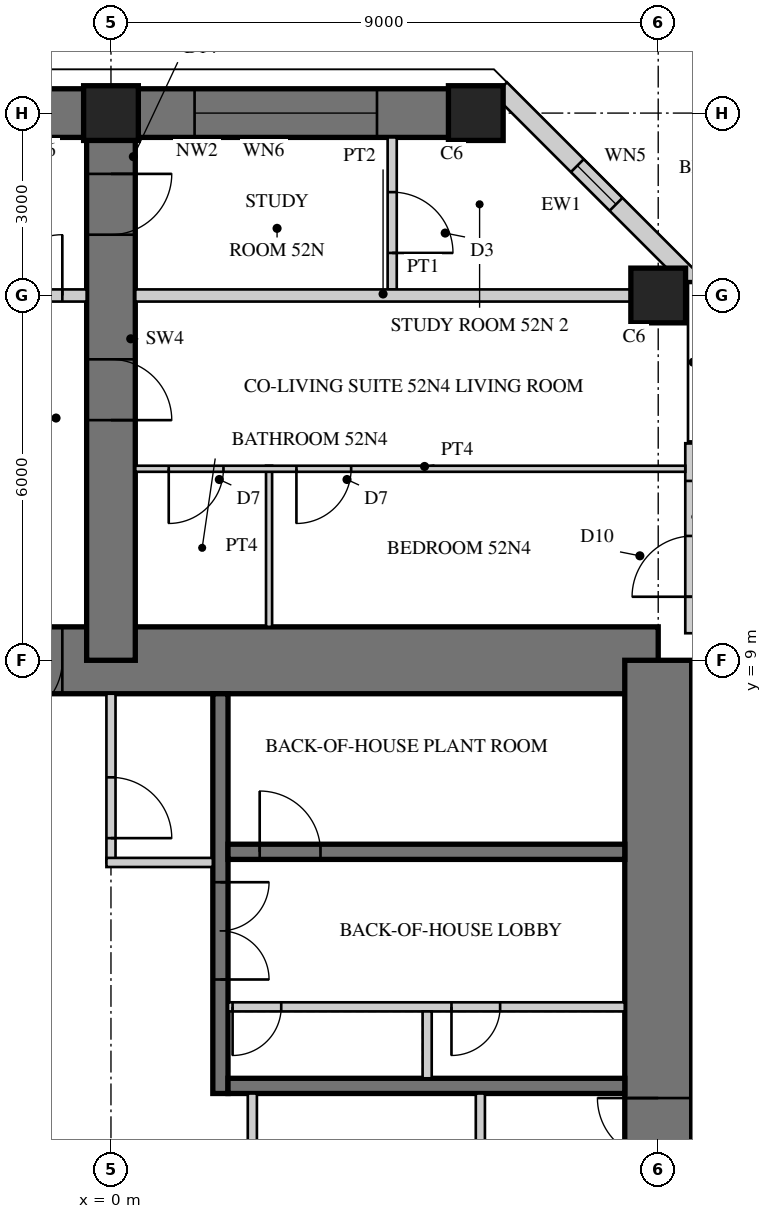
"""IFC4 building model, lengths in metres.
Left out: names, types, materials, properties, quantities, classifications, styles, units other than length and angle.
Written with IfcOpenShell. Run it as: python <this file> out.ifc"""

import sys

from ifc_helpers import new_model, si_unit, direction, frame, frame_2d, origin, origin_2d, place, context, subcontext, project, spatial, rectangle, hollow_rectangle, extrude, element, fill, save


model = new_model("IFC4")
c1 = context("Model", 3, precision=1e-05, world=origin(), true_north=direction((0.0, 1.0)))
c2 = subcontext(c1, "Body", "Model", "MODEL_VIEW")
j1 = project(units=[si_unit("LENGTHUNIT", "METRE"), si_unit("PLANEANGLEUNIT", "RADIAN")], contexts=[c1])
p1 = place(None, origin())
s1 = spatial("IfcSite", under=j1, at=p1, CompositionType="ELEMENT")
p2 = place(p1, origin())
s2 = spatial("IfcBuilding", under=s1, at=p2, CompositionType="ELEMENT")
p3 = place(p2, frame((0.0, 0.0, 206.9)))
s3 = spatial("IfcBuildingStorey", under=s2, at=p3, CompositionType="ELEMENT", Elevation=206.9)
p4 = place(p3, frame((9.0, 9.0, 0.0), z_axis=(0.0, 0.0, 1.0), x_axis=(-1.0, 0.0, 0.0)))
e1 = element("IfcWall", 1, at=p4, inside=s3, PredefinedType="SHEAR", context=c2, shape_type="SweptSolid", body=[
    extrude(rectangle(XDim=18.0, YDim=1.1, at=frame_2d((9.0, 0.0))), origin(), (0.0, 0.0, 1.0), 3.4),
])
p5 = place(p4, frame((9.8, 0.0, 0.0)))
e2 = element("IfcOpeningElement", 2, at=p5, cuts=e1, PredefinedType="OPENING", context=c2, shape_type="SweptSolid", body=[
    extrude(rectangle(XDim=1.0, YDim=2.4, at=frame_2d((0.5, 1.2))), frame((0.0, 0.56, 0.0), z_axis=(0.0, -1.0, 0.0), x_axis=(1.0, 0.0, 0.0)), (0.0, 0.0, 1.0), 1.12),
])
p6 = place(p3, frame((9.0, -9.0, 0.0), z_axis=(0.0, 0.0, 1.0), x_axis=(0.0, 1.0, 0.0)))
e3 = element("IfcWall", 3, at=p6, inside=s3, PredefinedType="SHEAR", context=c2, shape_type="SweptSolid", body=[
    extrude(rectangle(XDim=18.0, YDim=1.1, at=frame_2d((9.0, 0.0))), origin(), (0.0, 0.0, 1.0), 3.4),
])
p7 = place(p6, frame((9.8, 0.0, 0.0)))
e4 = element("IfcOpeningElement", 4, at=p7, cuts=e3, PredefinedType="OPENING", context=c2, shape_type="SweptSolid", body=[
    extrude(rectangle(XDim=1.0, YDim=2.4, at=frame_2d((0.5, 1.2))), frame((0.0, 0.56, 0.0), z_axis=(0.0, -1.0, 0.0), x_axis=(1.0, 0.0, 0.0)), (0.0, 0.0, 1.0), 1.12),
])
p8 = place(p3, frame((1.8, 1.875, 0.0), z_axis=(0.0, 0.0, 1.0), x_axis=(0.0, 1.0, 0.0)))
e5 = element("IfcWall", 5, at=p8, inside=s3, PredefinedType="SHEAR", context=c2, shape_type="SweptSolid", body=[
    extrude(rectangle(XDim=6.575, YDim=0.25, at=frame_2d((3.288, 0.0))), origin(), (0.0, 0.0, 1.0), 3.4),
])
p9 = place(p8, frame((1.875, 0.0, 0.0)))
e6 = element("IfcOpeningElement", 6, at=p9, cuts=e5, PredefinedType="OPENING", context=c2, shape_type="SweptSolid", body=[
    extrude(rectangle(XDim=1.6, YDim=2.4, at=frame_2d((0.8, 1.2))), frame((0.0, 0.135, 0.0), z_axis=(0.0, -1.0, 0.0), x_axis=(1.0, 0.0, 0.0)), (0.0, 0.0, 1.0), 0.27),
])
p10 = place(p3, frame((1.925, 2.0, 0.0), z_axis=(0.0, 0.0, 1.0), x_axis=(1.0, 0.0, 0.0)))
e7 = element("IfcWall", 7, at=p10, inside=s3, PredefinedType="SHEAR", context=c2, shape_type="SweptSolid", body=[
    extrude(rectangle(XDim=6.525, YDim=0.25, at=frame_2d((3.262, 0.0))), origin(), (0.0, 0.0, 1.0), 3.4),
])
p11 = place(p3, frame((1.925, 5.85, 0.0), z_axis=(0.0, 0.0, 1.0), x_axis=(1.0, 0.0, 0.0)))
e8 = element("IfcWall", 8, at=p11, inside=s3, PredefinedType="SHEAR", context=c2, shape_type="SweptSolid", body=[
    extrude(rectangle(XDim=6.525, YDim=0.25, at=frame_2d((3.262, 0.0))), origin(), (0.0, 0.0, 1.0), 3.4),
])
p12 = place(p11, frame((0.521, 0.0, 0.0)))
e9 = element("IfcOpeningElement", 9, at=p12, cuts=e8, PredefinedType="OPENING", context=c2, shape_type="SweptSolid", body=[
    extrude(rectangle(XDim=1.0, YDim=2.1, at=frame_2d((0.5, 1.05))), frame((0.0, 0.135, 0.0), z_axis=(0.0, -1.0, 0.0), x_axis=(1.0, 0.0, 0.0)), (0.0, 0.0, 1.0), 0.27),
])
p13 = place(p3, frame((1.925, 3.3, 0.0), z_axis=(0.0, 0.0, 1.0), x_axis=(1.0, 0.0, 0.0)))
e10 = element("IfcWall", 10, at=p13, inside=s3, PredefinedType="PARTITIONING", context=c2, shape_type="SweptSolid", body=[
    extrude(rectangle(XDim=6.525, YDim=0.15, at=frame_2d((3.262, 0.0))), origin(), (0.0, 0.0, 1.0), 3.4),
])
p14 = place(p13, frame((0.075, 0.0, 0.0)))
e11 = element("IfcOpeningElement", 11, at=p14, cuts=e10, PredefinedType="OPENING", context=c2, shape_type="SweptSolid", body=[
    extrude(rectangle(XDim=0.8, YDim=2.1, at=frame_2d((0.4, 1.05))), frame((0.0, 0.085, 0.0), z_axis=(0.0, -1.0, 0.0), x_axis=(1.0, 0.0, 0.0)), (0.0, 0.0, 1.0), 0.17),
])
p15 = place(p13, frame((3.675, 0.0, 0.0)))
e12 = element("IfcOpeningElement", 12, at=p15, cuts=e10, PredefinedType="OPENING", context=c2, shape_type="SweptSolid", body=[
    extrude(rectangle(XDim=0.8, YDim=2.1, at=frame_2d((0.4, 1.05))), frame((0.0, 0.085, 0.0), z_axis=(0.0, -1.0, 0.0), x_axis=(1.0, 0.0, 0.0)), (0.0, 0.0, 1.0), 0.17),
])
p16 = place(p3, frame((5.2, 2.125, 0.0), z_axis=(0.0, 0.0, 1.0), x_axis=(0.0, 1.0, 0.0)))
e13 = element("IfcWall", 13, at=p16, inside=s3, PredefinedType="PARTITIONING", context=c2, shape_type="SweptSolid", body=[
    extrude(rectangle(XDim=1.1, YDim=0.15, at=frame_2d((0.55, 0.0))), origin(), (0.0, 0.0, 1.0), 3.4),
])
p17 = place(p3, frame((0.0, 9.0, 0.0), z_axis=(0.0, 0.0, 1.0), x_axis=(0.0, 1.0, 0.0)))
e14 = element("IfcWall", 14, at=p17, inside=s3, PredefinedType="SHEAR", context=c2, shape_type="SweptSolid", body=[
    extrude(rectangle(XDim=9.0, YDim=0.8, at=frame_2d((4.5, 0.0))), origin(), (0.0, 0.0, 1.0), 3.4),
])
p18 = place(p17, frame((3.95, 0.0, 0.0)))
e15 = element("IfcOpeningElement", 15, at=p18, cuts=e14, PredefinedType="OPENING", context=c2, shape_type="SweptSolid", body=[
    extrude(rectangle(XDim=1.0, YDim=2.15, at=frame_2d((0.5, 1.075))), frame((0.0, 0.41, 0.0), z_axis=(0.0, -1.0, 0.0), x_axis=(1.0, 0.0, 0.0)), (0.0, 0.0, 1.0), 0.82),
])
p19 = place(p17, frame((7.0, 0.0, 0.0)))
e16 = element("IfcOpeningElement", 16, at=p19, cuts=e14, PredefinedType="OPENING", context=c2, shape_type="SweptSolid", body=[
    extrude(rectangle(XDim=1.0, YDim=2.2, at=frame_2d((0.5, 1.1))), frame((0.0, 0.41, 0.0), z_axis=(0.0, -1.0, 0.0), x_axis=(1.0, 0.0, 0.0)), (0.0, 0.0, 1.0), 0.82),
])
p20 = place(p3, frame((6.0, 18.0, 0.0), z_axis=(0.0, 0.0, 1.0), x_axis=(-1.0, 0.0, 0.0)))
e17 = element("IfcWall", 17, at=p20, inside=s3, PredefinedType="SHEAR", context=c2, shape_type="SweptSolid", body=[
    extrude(rectangle(XDim=12.0, YDim=0.8, at=frame_2d((6.0, 0.0))), origin(), (0.0, 0.0, 1.0), 3.4),
])
p21 = place(p20, frame((1.625, 0.0, 0.6)))
e18 = element("IfcOpeningElement", 18, at=p21, cuts=e17, PredefinedType="OPENING", context=c2, shape_type="SweptSolid", body=[
    extrude(rectangle(XDim=3.0, YDim=2.4, at=frame_2d((1.5, 1.2))), frame((0.0, 0.41, 0.0), z_axis=(0.0, -1.0, 0.0), x_axis=(1.0, 0.0, 0.0)), (0.0, 0.0, 1.0), 0.82),
])
p22 = place(p20, frame((7.375, 0.0, 0.6)))
e19 = element("IfcOpeningElement", 19, at=p22, cuts=e17, PredefinedType="OPENING", context=c2, shape_type="SweptSolid", body=[
    extrude(rectangle(XDim=3.0, YDim=2.4, at=frame_2d((1.5, 1.2))), frame((0.0, 0.41, 0.0), z_axis=(0.0, -1.0, 0.0), x_axis=(1.0, 0.0, 0.0)), (0.0, 0.0, 1.0), 0.82),
])
for number, where, z_axis, x_axis in (
    (20, (9.0, 15.0, 0.0), (0.0, 0.0, 1.0), (1.0, 0.0, 0.0)),
    (21, (6.0, 18.0, 0.0), (0.0, 0.0, 1.0), (1.0, 0.0, 0.0)),
    (22, (0.0, 18.0, 0.0), (0.0, 0.0, 1.0), (1.0, 0.0, 0.0)),
):
    element("IfcColumn", number, at=place(p3, frame(where, z_axis=z_axis, x_axis=x_axis)), inside=s3, PredefinedType="COLUMN", context=c2, shape_type="SweptSolid", body=[
        extrude(rectangle(XDim=0.9, YDim=0.9, at=origin_2d()), origin(), (0.0, 0.0, 1.0), 3.4),
    ])
p23 = place(p3, frame((9.57, 9.445, 0.0), z_axis=(0.0, 0.0, 1.0), x_axis=(0.0, 1.0, 0.0)))
e23 = element("IfcWall", 23, at=p23, inside=s3, PredefinedType="SOLIDWALL", context=c2, shape_type="SweptSolid", body=[
    extrude(rectangle(XDim=3.125, YDim=0.25, at=frame_2d((1.562, 0.0))), origin(), (0.0, 0.0, 1.0), 3.22),
])
p24 = place(p23, frame((0.6, 0.0, 0.0)))
e24 = element("IfcOpeningElement", 24, at=p24, cuts=e23, PredefinedType="OPENING", context=c2, shape_type="SweptSolid", body=[
    extrude(rectangle(XDim=1.0, YDim=2.2, at=frame_2d((0.5, 1.1))), frame((0.0, 0.135, 0.0), z_axis=(0.0, -1.0, 0.0), x_axis=(1.0, 0.0, 0.0)), (0.0, 0.0, 1.0), 0.27),
])
p25 = place(p3, frame((9.57, 15.236, 0.0), z_axis=(0.0, 0.0, 1.0), x_axis=(-0.707134062067, 0.707079499254, 0.0)))
e25 = element("IfcWall", 25, at=p25, inside=s3, PredefinedType="SOLIDWALL", context=c2, shape_type="SweptSolid", body=[
    extrude(rectangle(XDim=4.475, YDim=0.3, at=frame_2d((2.237, 0.0))), origin(), (0.0, 0.0, 1.0), 3.22),
])
p26 = place(p25, frame((1.787, 0.0, 0.3)))
e26 = element("IfcOpeningElement", 26, at=p26, cuts=e25, PredefinedType="OPENING", context=c2, shape_type="SweptSolid", body=[
    extrude(rectangle(XDim=0.9, YDim=2.4, at=frame_2d((0.45, 1.2))), frame((0.0, 0.16, 0.0), z_axis=(0.0, -1.0, 0.0), x_axis=(1.0, 0.0, 0.0)), (0.0, 0.0, 1.0), 0.32),
])
for number, where, z_axis, x_axis in (
    (27, (2.325, 1.875, 0.0), (0.0, 0.0, 1.0), (0.0, -1.0, 0.0)),
    (28, (6.075, -0.075, 0.0), (0.0, 0.0, 1.0), (0.0, 1.0, 0.0)),
):
    element("IfcWall", number, at=place(p3, frame(where, z_axis=z_axis, x_axis=x_axis)), inside=s3, PredefinedType="PARTITIONING", context=c2, shape_type="SweptSolid", body=[
        extrude(rectangle(XDim=1.95, YDim=0.15, at=frame_2d((0.975, 0.0))), origin(), (0.0, 0.0, 1.0), 3.22),
    ])
p27 = place(p3, frame((0.0, 5.675, 0.0), z_axis=(0.0, 0.0, 1.0), x_axis=(0.0, 1.0, 0.0)))
e29 = element("IfcWall", 29, at=p27, inside=s3, PredefinedType="PARTITIONING", context=c2, shape_type="SweptSolid", body=[
    extrude(rectangle(XDim=2.775, YDim=0.15, at=frame_2d((1.387, 0.0))), origin(), (0.0, 0.0, 1.0), 3.22),
])
p28 = place(p27, frame((0.4, 0.0, 0.0)))
e30 = element("IfcOpeningElement", 30, at=p28, cuts=e29, PredefinedType="OPENING", context=c2, shape_type="SweptSolid", body=[
    extrude(rectangle(XDim=1.0, YDim=2.1, at=frame_2d((0.5, 1.05))), frame((0.0, 0.085, 0.0), z_axis=(0.0, -1.0, 0.0), x_axis=(1.0, 0.0, 0.0)), (0.0, 0.0, 1.0), 0.17),
])
p29 = place(p3, frame((1.675, 5.675, 0.0), z_axis=(0.0, 0.0, 1.0), x_axis=(-1.0, 0.0, 0.0)))
e31 = element("IfcWall", 31, at=p29, inside=s3, PredefinedType="PARTITIONING", context=c2, shape_type="SweptSolid", body=[
    extrude(rectangle(XDim=1.75, YDim=0.15, at=frame_2d((0.875, 0.0))), origin(), (0.0, 0.0, 1.0), 3.22),
])
p30 = place(p3, frame((2.6, 9.55, 0.0), z_axis=(0.0, 0.0, 1.0), x_axis=(0.0, 1.0, 0.0)))
e32 = element("IfcWall", 32, at=p30, inside=s3, PredefinedType="PARTITIONING", context=c2, shape_type="SweptSolid", body=[
    extrude(rectangle(XDim=2.65, YDim=0.1, at=frame_2d((1.325, 0.0))), origin(), (0.0, 0.0, 1.0), 3.22),
])
p31 = place(p3, frame((9.445, 12.15, 0.0), z_axis=(0.0, 0.0, 1.0), x_axis=(-1.0, 0.0, 0.0)))
e33 = element("IfcWall", 33, at=p31, inside=s3, PredefinedType="PARTITIONING", context=c2, shape_type="SweptSolid", body=[
    extrude(rectangle(XDim=9.045, YDim=0.1, at=frame_2d((4.522, 0.0))), origin(), (0.0, 0.0, 1.0), 3.22),
])
p32 = place(p31, frame((5.495, 0.0, 0.0)))
e34 = element("IfcOpeningElement", 34, at=p32, cuts=e33, PredefinedType="OPENING", context=c2, shape_type="SweptSolid", body=[
    extrude(rectangle(XDim=0.9, YDim=2.1, at=frame_2d((0.45, 1.05))), frame((0.0, 0.06, 0.0), z_axis=(0.0, -1.0, 0.0), x_axis=(1.0, 0.0, 0.0)), (0.0, 0.0, 1.0), 0.12),
])
p33 = place(p31, frame((7.595, 0.0, 0.0)))
e35 = element("IfcOpeningElement", 35, at=p33, cuts=e33, PredefinedType="OPENING", context=c2, shape_type="SweptSolid", body=[
    extrude(rectangle(XDim=0.9, YDim=2.1, at=frame_2d((0.45, 1.05))), frame((0.0, 0.06, 0.0), z_axis=(0.0, -1.0, 0.0), x_axis=(1.0, 0.0, 0.0)), (0.0, 0.0, 1.0), 0.12),
])
p34 = place(p3, frame((4.625, 15.1, 0.0), z_axis=(0.0, 0.0, 1.0), x_axis=(0.0, 1.0, 0.0)))
e36 = element("IfcWall", 36, at=p34, inside=s3, PredefinedType="PARTITIONING", context=c2, shape_type="SweptSolid", body=[
    extrude(rectangle(XDim=2.5, YDim=0.15, at=frame_2d((1.25, 0.0))), origin(), (0.0, 0.0, 1.0), 3.22),
])
p35 = place(p34, frame((0.6, 0.0, 0.0)))
e37 = element("IfcOpeningElement", 37, at=p35, cuts=e36, PredefinedType="OPENING", context=c2, shape_type="SweptSolid", body=[
    extrude(rectangle(XDim=1.0, YDim=2.1, at=frame_2d((0.5, 1.05))), frame((0.0, 0.085, 0.0), z_axis=(0.0, -1.0, 0.0), x_axis=(1.0, 0.0, 0.0)), (0.0, 0.0, 1.0), 0.17),
])
p36 = place(p3, frame((8.55, 15.0, 0.0), z_axis=(0.0, 0.0, 1.0), x_axis=(-1.0, 0.0, 0.0)))
e38 = element("IfcWall", 38, at=p36, inside=s3, PredefinedType="SOLIDWALL", context=c2, shape_type="SweptSolid", body=[
    extrude(rectangle(XDim=8.15, YDim=0.2, at=frame_2d((4.075, 0.0))), origin(), (0.0, 0.0, 1.0), 2.47),
])
p37 = place(p3, frame((-0.4, 15.0, 0.0), z_axis=(0.0, 0.0, 1.0), x_axis=(-1.0, 0.0, 0.0)))
e39 = element("IfcWall", 39, at=p37, inside=s3, PredefinedType="SOLIDWALL", context=c2, shape_type="SweptSolid", body=[
    extrude(rectangle(XDim=8.15, YDim=0.2, at=frame_2d((4.075, 0.0))), origin(), (0.0, 0.0, 1.0), 2.47),
])
p38 = place(p37, frame((0.4, 0.0, 0.0)))
e40 = element("IfcOpeningElement", 40, at=p38, cuts=e39, PredefinedType="OPENING", context=c2, shape_type="SweptSolid", body=[
    extrude(rectangle(XDim=1.0, YDim=2.2, at=frame_2d((0.5, 1.1))), frame((0.0, 0.11, 0.0), z_axis=(0.0, -1.0, 0.0), x_axis=(1.0, 0.0, 0.0)), (0.0, 0.0, 1.0), 0.22),
])
p39 = place(p24, origin())
e41 = element("IfcDoor", 41, at=p39, inside=s3, OperationType="SINGLE_SWING_LEFT", PredefinedType="DOOR", context=c2, shape_type="SweptSolid", body=[
    extrude(hollow_rectangle(XDim=1.0, YDim=2.2, WallThickness=0.06, at=frame_2d((0.5, 1.1))), frame((0.0, 0.025, 0.0), z_axis=(0.0, -1.0, 0.0), x_axis=(1.0, 0.0, 0.0)), (0.0, 0.0, 1.0), 0.05),
    extrude(rectangle(XDim=0.879, YDim=2.079, at=frame_2d((0.5, 1.1))), frame((0.0, 0.025, 0.0), z_axis=(0.0, -1.0, 0.0), x_axis=(1.0, 0.0, 0.0)), (0.0, 0.0, 1.0), 0.05),
])
fill(e24, e41)
p40 = place(p26, origin())
e42 = element("IfcWindow", 42, at=p40, inside=s3, PartitioningType="SINGLE_PANEL", PredefinedType="WINDOW", context=c2, shape_type="SweptSolid", body=[
    extrude(hollow_rectangle(XDim=0.9, YDim=2.4, WallThickness=0.06, at=frame_2d((0.45, 1.2))), frame((0.0, 0.03, 0.0), z_axis=(0.0, -1.0, 0.0), x_axis=(1.0, 0.0, 0.0)), (0.0, 0.0, 1.0), 0.06),
    extrude(rectangle(XDim=0.779, YDim=2.279, at=frame_2d((0.45, 1.2))), frame((0.0, 0.03, 0.0), z_axis=(0.0, -1.0, 0.0), x_axis=(1.0, 0.0, 0.0)), (0.0, 0.0, 1.0), 0.06),
])
fill(e26, e42)
p41 = place(p21, origin())
e43 = element("IfcWindow", 43, at=p41, inside=s3, PartitioningType="SINGLE_PANEL", PredefinedType="WINDOW", context=c2, shape_type="SweptSolid", body=[
    extrude(hollow_rectangle(XDim=3.0, YDim=2.4, WallThickness=0.06, at=frame_2d((1.5, 1.2))), frame((0.0, 0.03, 0.0), z_axis=(0.0, -1.0, 0.0), x_axis=(1.0, 0.0, 0.0)), (0.0, 0.0, 1.0), 0.06),
    extrude(rectangle(XDim=2.879, YDim=2.279, at=frame_2d((1.5, 1.2))), frame((0.0, 0.03, 0.0), z_axis=(0.0, -1.0, 0.0), x_axis=(1.0, 0.0, 0.0)), (0.0, 0.0, 1.0), 0.06),
])
fill(e18, e43)
p42 = place(p28, frame((1.0, 0.0, 0.0), z_axis=(0.0, 0.0, 1.0), x_axis=(-1.0, 0.0, 0.0)))
e44 = element("IfcDoor", 44, at=p42, inside=s3, OperationType="SINGLE_SWING_RIGHT", PredefinedType="DOOR", context=c2, shape_type="SweptSolid", body=[
    extrude(rectangle(XDim=1.0, YDim=2.1, at=frame_2d((0.5, 1.05))), frame((0.0, 0.025, 0.0), z_axis=(0.0, -1.0, 0.0), x_axis=(1.0, 0.0, 0.0)), (0.0, 0.0, 1.0), 0.05),
])
fill(e30, e44)
p43 = place(p32, origin())
e45 = element("IfcDoor", 45, at=p43, inside=s3, OperationType="SINGLE_SWING_RIGHT", PredefinedType="DOOR", context=c2, shape_type="SweptSolid", body=[
    extrude(rectangle(XDim=0.9, YDim=2.1, at=frame_2d((0.45, 1.05))), frame((0.0, 0.025, 0.0), z_axis=(0.0, -1.0, 0.0), x_axis=(1.0, 0.0, 0.0)), (0.0, 0.0, 1.0), 0.05),
])
fill(e34, e45)
p44 = place(p33, origin())
e46 = element("IfcDoor", 46, at=p44, inside=s3, OperationType="SINGLE_SWING_RIGHT", PredefinedType="DOOR", context=c2, shape_type="SweptSolid", body=[
    extrude(rectangle(XDim=0.9, YDim=2.1, at=frame_2d((0.45, 1.05))), frame((0.0, 0.025, 0.0), z_axis=(0.0, -1.0, 0.0), x_axis=(1.0, 0.0, 0.0)), (0.0, 0.0, 1.0), 0.05),
])
fill(e35, e46)
p45 = place(p35, frame((1.0, 0.0, 0.0), z_axis=(0.0, 0.0, 1.0), x_axis=(-1.0, 0.0, 0.0)))
e47 = element("IfcDoor", 47, at=p45, inside=s3, OperationType="SINGLE_SWING_RIGHT", PredefinedType="DOOR", context=c2, shape_type="SweptSolid", body=[
    extrude(rectangle(XDim=1.0, YDim=2.1, at=frame_2d((0.5, 1.05))), frame((0.0, 0.025, 0.0), z_axis=(0.0, -1.0, 0.0), x_axis=(1.0, 0.0, 0.0)), (0.0, 0.0, 1.0), 0.05),
])
fill(e37, e47)
p46 = place(p38, frame((1.0, 0.0, 0.0), z_axis=(0.0, 0.0, 1.0), x_axis=(-1.0, 0.0, 0.0)))
e48 = element("IfcDoor", 48, at=p46, inside=s3, OperationType="SINGLE_SWING_RIGHT", PredefinedType="DOOR", context=c2, shape_type="SweptSolid", body=[
    extrude(rectangle(XDim=1.0, YDim=2.2, at=frame_2d((0.5, 1.1))), frame((0.0, 0.025, 0.0), z_axis=(0.0, -1.0, 0.0), x_axis=(1.0, 0.0, 0.0)), (0.0, 0.0, 1.0), 0.05),
])
fill(e40, e48)
p47 = place(p18, frame((1.0, 0.0, 0.0), z_axis=(0.0, 0.0, 1.0), x_axis=(-1.0, 0.0, 0.0)))
e49 = element("IfcDoor", 49, at=p47, inside=s3, OperationType="SINGLE_SWING_RIGHT", PredefinedType="DOOR", context=c2, shape_type="SweptSolid", body=[
    extrude(rectangle(XDim=1.0, YDim=2.15, at=frame_2d((0.5, 1.075))), frame((0.0, 0.025, 0.0), z_axis=(0.0, -1.0, 0.0), x_axis=(1.0, 0.0, 0.0)), (0.0, 0.0, 1.0), 0.05),
])
fill(e15, e49)
p48 = place(p19, frame((1.0, 0.0, 0.0), z_axis=(0.0, 0.0, 1.0), x_axis=(-1.0, 0.0, 0.0)))
e50 = element("IfcDoor", 50, at=p48, inside=s3, OperationType="SINGLE_SWING_LEFT", PredefinedType="DOOR", context=c2, shape_type="SweptSolid", body=[
    extrude(rectangle(XDim=1.0, YDim=2.2, at=frame_2d((0.5, 1.1))), frame((0.0, 0.025, 0.0), z_axis=(0.0, -1.0, 0.0), x_axis=(1.0, 0.0, 0.0)), (0.0, 0.0, 1.0), 0.05),
])
fill(e16, e50)
p49 = place(p5, origin())
e51 = element("IfcDoor", 51, at=p49, inside=s3, OperationType="SINGLE_SWING_RIGHT", PredefinedType="DOOR", context=c2, shape_type="SweptSolid", body=[
    extrude(rectangle(XDim=1.0, YDim=2.4, at=frame_2d((0.5, 1.2))), frame((0.0, 0.055, 0.0), z_axis=(0.0, -1.0, 0.0), x_axis=(1.0, 0.0, 0.0)), (0.0, 0.0, 1.0), 0.05),
])
fill(e2, e51)
p50 = place(p7, origin())
e52 = element("IfcDoor", 52, at=p50, inside=s3, OperationType="SINGLE_SWING_RIGHT", PredefinedType="DOOR", context=c2, shape_type="SweptSolid", body=[
    extrude(rectangle(XDim=1.0, YDim=2.4, at=frame_2d((0.5, 1.2))), frame((0.0, 0.055, 0.0), z_axis=(0.0, -1.0, 0.0), x_axis=(1.0, 0.0, 0.0)), (0.0, 0.0, 1.0), 0.05),
])
fill(e4, e52)
p51 = place(p9, frame((1.6, 0.0, 0.0), z_axis=(0.0, 0.0, 1.0), x_axis=(-1.0, 0.0, 0.0)))
e53 = element("IfcDoor", 53, at=p51, inside=s3, OperationType="DOUBLE_DOOR_SINGLE_SWING", PredefinedType="DOOR", context=c2, shape_type="SweptSolid", body=[
    extrude(rectangle(XDim=1.6, YDim=2.4, at=frame_2d((0.8, 1.2))), frame((0.0, 0.025, 0.0), z_axis=(0.0, -1.0, 0.0), x_axis=(1.0, 0.0, 0.0)), (0.0, 0.0, 1.0), 0.05),
])
fill(e6, e53)
p52 = place(p14, frame((0.8, 0.0, 0.0), z_axis=(0.0, 0.0, 1.0), x_axis=(-1.0, 0.0, 0.0)))
e54 = element("IfcDoor", 54, at=p52, inside=s3, OperationType="SINGLE_SWING_RIGHT", PredefinedType="DOOR", context=c2, shape_type="SweptSolid", body=[
    extrude(rectangle(XDim=0.8, YDim=2.1, at=frame_2d((0.4, 1.05))), frame((0.0, 0.025, 0.0), z_axis=(0.0, -1.0, 0.0), x_axis=(1.0, 0.0, 0.0)), (0.0, 0.0, 1.0), 0.05),
])
fill(e11, e54)
p53 = place(p15, frame((0.8, 0.0, 0.0), z_axis=(0.0, 0.0, 1.0), x_axis=(-1.0, 0.0, 0.0)))
e55 = element("IfcDoor", 55, at=p53, inside=s3, OperationType="SINGLE_SWING_RIGHT", PredefinedType="DOOR", context=c2, shape_type="SweptSolid", body=[
    extrude(rectangle(XDim=0.8, YDim=2.1, at=frame_2d((0.4, 1.05))), frame((0.0, 0.025, 0.0), z_axis=(0.0, -1.0, 0.0), x_axis=(1.0, 0.0, 0.0)), (0.0, 0.0, 1.0), 0.05),
])
fill(e12, e55)
p54 = place(p12, origin())
e56 = element("IfcDoor", 56, at=p54, inside=s3, OperationType="SINGLE_SWING_LEFT", PredefinedType="DOOR", context=c2, shape_type="SweptSolid", body=[
    extrude(rectangle(XDim=1.0, YDim=2.1, at=frame_2d((0.5, 1.05))), frame((0.0, 0.025, 0.0), z_axis=(0.0, -1.0, 0.0), x_axis=(1.0, 0.0, 0.0)), (0.0, 0.0, 1.0), 0.05),
])
fill(e9, e56)
save(model, sys.argv[1])
